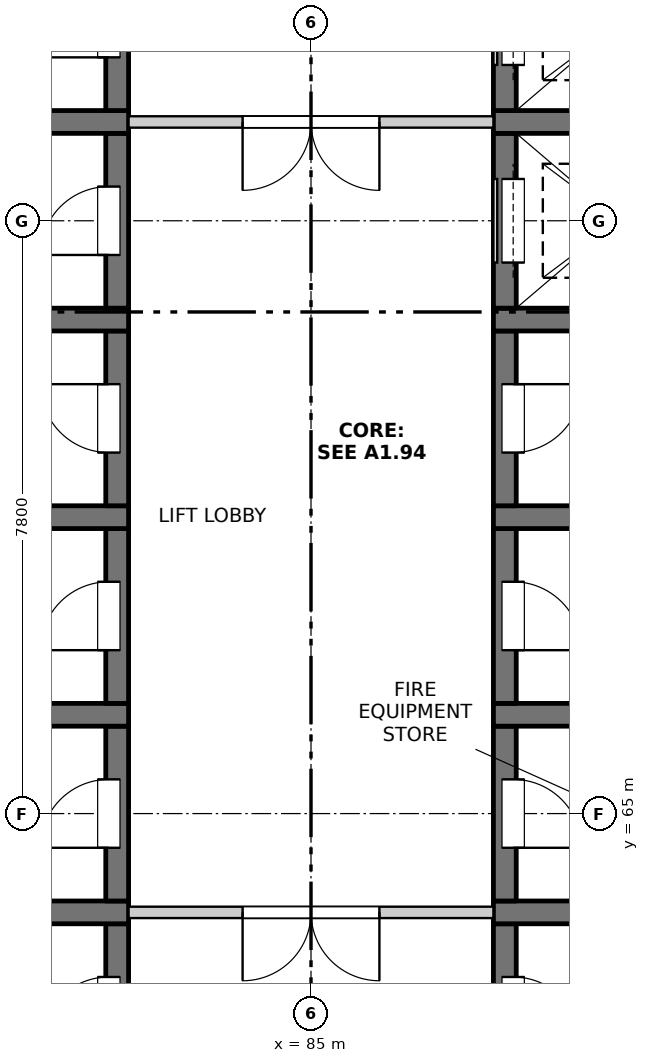
"""IFC4 building model, lengths in metres.
Left out: names, types, materials, properties, quantities, classifications, styles, units other than length and angle.
Written with IfcOpenShell. Run it as: python <this file> out.ifc"""

import sys

from ifc_helpers import new_model, si_unit, direction, frame, frame_2d, origin, place, context, subcontext, project, spatial, rectangle, extrude, element, fill, save


model = new_model("IFC4")
c1 = context("Model", 3, precision=1e-05, world=origin(), true_north=direction((0.0, 1.0)))
c2 = subcontext(c1, "Body", "Model", "MODEL_VIEW")
j1 = project(units=[si_unit("LENGTHUNIT", "METRE"), si_unit("PLANEANGLEUNIT", "RADIAN")], contexts=[c1])
p1 = place(None, origin())
s1 = spatial("IfcSite", under=j1, at=p1, CompositionType="ELEMENT")
p2 = place(p1, origin())
s2 = spatial("IfcBuilding", under=s1, at=p2, CompositionType="ELEMENT")
p3 = place(p2, frame((0.0, 0.0, 158.8)))
s3 = spatial("IfcBuildingStorey", under=s2, at=p3, CompositionType="ELEMENT", Elevation=158.8)
p4 = place(p3, frame((82.45, 61.25, -0.25), z_axis=(0.0, 0.0, 1.0), x_axis=(0.0, 1.0, 0.0)))
e1 = element("IfcWall", 1, at=p4, inside=s3, PredefinedType="SOLIDWALL", context=c2, shape_type="SweptSolid", body=[
    extrude(rectangle(XDim=2.3, YDim=0.3, at=frame_2d((1.15, 0.0))), origin(), (0.0, 0.0, 1.0), 3.4),
])
p5 = place(p4, frame((0.7, 0.0, 0.25)))
e2 = element("IfcOpeningElement", 2, at=p5, cuts=e1, PredefinedType="OPENING", context=c2, shape_type="SweptSolid", body=[
    extrude(rectangle(XDim=0.9, YDim=2.1, at=frame_2d((0.45, 1.05))), frame((0.0, 0.16, 0.0), z_axis=(0.0, -1.0, 0.0), x_axis=(1.0, 0.0, 0.0)), (0.0, 0.0, 1.0), 0.32),
])
p6 = place(p3, frame((79.6, 63.7, -0.25), z_axis=(0.0, 0.0, 1.0), x_axis=(1.0, 0.0, 0.0)))
e3 = element("IfcWall", 3, at=p6, inside=s3, PredefinedType="SOLIDWALL", context=c2, shape_type="SweptSolid", body=[
    extrude(rectangle(XDim=3.0, YDim=0.3, at=frame_2d((1.5, 0.0))), origin(), (0.0, 0.0, 1.0), 3.4),
])
p7 = place(p3, frame((82.45, 63.85, -0.25), z_axis=(0.0, 0.0, 1.0), x_axis=(0.0, 1.0, 0.0)))
e4 = element("IfcWall", 4, at=p7, inside=s3, PredefinedType="SOLIDWALL", context=c2, shape_type="SweptSolid", body=[
    extrude(rectangle(XDim=2.3, YDim=0.3, at=frame_2d((1.15, 0.0))), origin(), (0.0, 0.0, 1.0), 3.4),
])
p8 = place(p7, frame((0.7, 0.0, 0.25)))
e5 = element("IfcOpeningElement", 5, at=p8, cuts=e4, PredefinedType="OPENING", context=c2, shape_type="SweptSolid", body=[
    extrude(rectangle(XDim=0.9, YDim=2.1, at=frame_2d((0.45, 1.05))), frame((0.0, 0.16, 0.0), z_axis=(0.0, -1.0, 0.0), x_axis=(1.0, 0.0, 0.0)), (0.0, 0.0, 1.0), 0.32),
])
p9 = place(p3, frame((79.6, 66.3, -0.25), z_axis=(0.0, 0.0, 1.0), x_axis=(1.0, 0.0, 0.0)))
e6 = element("IfcWall", 6, at=p9, inside=s3, PredefinedType="SOLIDWALL", context=c2, shape_type="SweptSolid", body=[
    extrude(rectangle(XDim=3.0, YDim=0.3, at=frame_2d((1.5, 0.0))), origin(), (0.0, 0.0, 1.0), 3.4),
])
p10 = place(p3, frame((82.45, 66.45, -0.25), z_axis=(0.0, 0.0, 1.0), x_axis=(0.0, 1.0, 0.0)))
e7 = element("IfcWall", 7, at=p10, inside=s3, PredefinedType="SOLIDWALL", context=c2, shape_type="SweptSolid", body=[
    extrude(rectangle(XDim=2.3, YDim=0.3, at=frame_2d((1.15, 0.0))), origin(), (0.0, 0.0, 1.0), 3.4),
])
p11 = place(p10, frame((0.7, 0.0, 0.25)))
e8 = element("IfcOpeningElement", 8, at=p11, cuts=e7, PredefinedType="OPENING", context=c2, shape_type="SweptSolid", body=[
    extrude(rectangle(XDim=0.9, YDim=2.1, at=frame_2d((0.45, 1.05))), frame((0.0, 0.16, 0.0), z_axis=(0.0, -1.0, 0.0), x_axis=(1.0, 0.0, 0.0)), (0.0, 0.0, 1.0), 0.32),
])
p12 = place(p3, frame((79.6, 68.9, -0.25), z_axis=(0.0, 0.0, 1.0), x_axis=(1.0, 0.0, 0.0)))
e9 = element("IfcWall", 9, at=p12, inside=s3, PredefinedType="SOLIDWALL", context=c2, shape_type="SweptSolid", body=[
    extrude(rectangle(XDim=3.0, YDim=0.3, at=frame_2d((1.5, 0.0))), origin(), (0.0, 0.0, 1.0), 3.4),
])
p13 = place(p3, frame((82.45, 69.05, -0.25), z_axis=(0.0, 0.0, 1.0), x_axis=(0.0, 1.0, 0.0)))
e10 = element("IfcWall", 10, at=p13, inside=s3, PredefinedType="SOLIDWALL", context=c2, shape_type="SweptSolid", body=[
    extrude(rectangle(XDim=2.3, YDim=0.3, at=frame_2d((1.15, 0.0))), origin(), (0.0, 0.0, 1.0), 3.4),
])
p14 = place(p13, frame((0.7, 0.0, 0.25)))
e11 = element("IfcOpeningElement", 11, at=p14, cuts=e10, PredefinedType="OPENING", context=c2, shape_type="SweptSolid", body=[
    extrude(rectangle(XDim=0.9, YDim=2.1, at=frame_2d((0.45, 1.05))), frame((0.0, 0.16, 0.0), z_axis=(0.0, -1.0, 0.0), x_axis=(1.0, 0.0, 0.0)), (0.0, 0.0, 1.0), 0.32),
])
p15 = place(p3, frame((79.6, 71.5, -0.25), z_axis=(0.0, 0.0, 1.0), x_axis=(1.0, 0.0, 0.0)))
e12 = element("IfcWall", 12, at=p15, inside=s3, PredefinedType="SOLIDWALL", context=c2, shape_type="SweptSolid", body=[
    extrude(rectangle(XDim=3.0, YDim=0.3, at=frame_2d((1.5, 0.0))), origin(), (0.0, 0.0, 1.0), 3.4),
])
p16 = place(p3, frame((82.45, 71.65, -0.25), z_axis=(0.0, 0.0, 1.0), x_axis=(0.0, 1.0, 0.0)))
e13 = element("IfcWall", 13, at=p16, inside=s3, PredefinedType="SOLIDWALL", context=c2, shape_type="SweptSolid", body=[
    extrude(rectangle(XDim=2.3, YDim=0.3, at=frame_2d((1.15, 0.0))), origin(), (0.0, 0.0, 1.0), 3.4),
])
p17 = place(p16, frame((0.7, 0.0, 0.25)))
e14 = element("IfcOpeningElement", 14, at=p17, cuts=e13, PredefinedType="OPENING", context=c2, shape_type="SweptSolid", body=[
    extrude(rectangle(XDim=0.9, YDim=2.1, at=frame_2d((0.45, 1.05))), frame((0.0, 0.16, 0.0), z_axis=(0.0, -1.0, 0.0), x_axis=(1.0, 0.0, 0.0)), (0.0, 0.0, 1.0), 0.32),
])
p18 = place(p3, frame((79.6, 74.1, -0.25), z_axis=(0.0, 0.0, 1.0), x_axis=(1.0, 0.0, 0.0)))
e15 = element("IfcWall", 15, at=p18, inside=s3, PredefinedType="SOLIDWALL", context=c2, shape_type="SweptSolid", body=[
    extrude(rectangle(XDim=3.0, YDim=0.3, at=frame_2d((1.5, 0.0))), origin(), (0.0, 0.0, 1.0), 3.4),
])
p19 = place(p3, frame((82.45, 74.25, -0.25), z_axis=(0.0, 0.0, 1.0), x_axis=(0.0, 1.0, 0.0)))
e16 = element("IfcWall", 16, at=p19, inside=s3, PredefinedType="SOLIDWALL", context=c2, shape_type="SweptSolid", body=[
    extrude(rectangle(XDim=2.3, YDim=0.3, at=frame_2d((1.15, 0.0))), origin(), (0.0, 0.0, 1.0), 3.4),
])
p20 = place(p19, frame((0.7, 0.0, 0.25)))
e17 = element("IfcOpeningElement", 17, at=p20, cuts=e16, PredefinedType="OPENING", context=c2, shape_type="SweptSolid", body=[
    extrude(rectangle(XDim=0.9, YDim=2.1, at=frame_2d((0.45, 1.05))), frame((0.0, 0.16, 0.0), z_axis=(0.0, -1.0, 0.0), x_axis=(1.0, 0.0, 0.0)), (0.0, 0.0, 1.0), 0.32),
])
p21 = place(p3, frame((87.55, 61.25, -0.25), z_axis=(0.0, 0.0, 1.0), x_axis=(0.0, 1.0, 0.0)))
e18 = element("IfcWall", 18, at=p21, inside=s3, PredefinedType="SOLIDWALL", context=c2, shape_type="SweptSolid", body=[
    extrude(rectangle(XDim=2.3, YDim=0.3, at=frame_2d((1.15, 0.0))), origin(), (0.0, 0.0, 1.0), 3.4),
])
p22 = place(p21, frame((0.7, 0.0, 0.25)))
e19 = element("IfcOpeningElement", 19, at=p22, cuts=e18, PredefinedType="OPENING", context=c2, shape_type="SweptSolid", body=[
    extrude(rectangle(XDim=0.9, YDim=2.1, at=frame_2d((0.45, 1.05))), frame((0.0, 0.16, 0.0), z_axis=(0.0, -1.0, 0.0), x_axis=(1.0, 0.0, 0.0)), (0.0, 0.0, 1.0), 0.32),
])
p23 = place(p3, frame((87.4, 63.7, -0.25), z_axis=(0.0, 0.0, 1.0), x_axis=(1.0, 0.0, 0.0)))
e20 = element("IfcWall", 20, at=p23, inside=s3, PredefinedType="SOLIDWALL", context=c2, shape_type="SweptSolid", body=[
    extrude(rectangle(XDim=3.0, YDim=0.3, at=frame_2d((1.5, 0.0))), origin(), (0.0, 0.0, 1.0), 3.4),
])
p24 = place(p3, frame((87.55, 63.85, -0.25), z_axis=(0.0, 0.0, 1.0), x_axis=(0.0, 1.0, 0.0)))
e21 = element("IfcWall", 21, at=p24, inside=s3, PredefinedType="SOLIDWALL", context=c2, shape_type="SweptSolid", body=[
    extrude(rectangle(XDim=2.3, YDim=0.3, at=frame_2d((1.15, 0.0))), origin(), (0.0, 0.0, 1.0), 3.4),
])
p25 = place(p24, frame((0.7, 0.0, 0.25)))
e22 = element("IfcOpeningElement", 22, at=p25, cuts=e21, PredefinedType="OPENING", context=c2, shape_type="SweptSolid", body=[
    extrude(rectangle(XDim=0.9, YDim=2.1, at=frame_2d((0.45, 1.05))), frame((0.0, 0.16, 0.0), z_axis=(0.0, -1.0, 0.0), x_axis=(1.0, 0.0, 0.0)), (0.0, 0.0, 1.0), 0.32),
])
p26 = place(p3, frame((87.4, 66.3, -0.25), z_axis=(0.0, 0.0, 1.0), x_axis=(1.0, 0.0, 0.0)))
e23 = element("IfcWall", 23, at=p26, inside=s3, PredefinedType="SOLIDWALL", context=c2, shape_type="SweptSolid", body=[
    extrude(rectangle(XDim=3.0, YDim=0.3, at=frame_2d((1.5, 0.0))), origin(), (0.0, 0.0, 1.0), 3.4),
])
p27 = place(p3, frame((87.55, 66.45, -0.25), z_axis=(0.0, 0.0, 1.0), x_axis=(0.0, 1.0, 0.0)))
e24 = element("IfcWall", 24, at=p27, inside=s3, PredefinedType="SOLIDWALL", context=c2, shape_type="SweptSolid", body=[
    extrude(rectangle(XDim=2.3, YDim=0.3, at=frame_2d((1.15, 0.0))), origin(), (0.0, 0.0, 1.0), 3.4),
])
p28 = place(p27, frame((0.7, 0.0, 0.25)))
e25 = element("IfcOpeningElement", 25, at=p28, cuts=e24, PredefinedType="OPENING", context=c2, shape_type="SweptSolid", body=[
    extrude(rectangle(XDim=0.9, YDim=2.1, at=frame_2d((0.45, 1.05))), frame((0.0, 0.16, 0.0), z_axis=(0.0, -1.0, 0.0), x_axis=(1.0, 0.0, 0.0)), (0.0, 0.0, 1.0), 0.32),
])
p29 = place(p3, frame((87.4, 68.9, -0.25), z_axis=(0.0, 0.0, 1.0), x_axis=(1.0, 0.0, 0.0)))
e26 = element("IfcWall", 26, at=p29, inside=s3, PredefinedType="SOLIDWALL", context=c2, shape_type="SweptSolid", body=[
    extrude(rectangle(XDim=3.0, YDim=0.3, at=frame_2d((1.5, 0.0))), origin(), (0.0, 0.0, 1.0), 3.4),
])
p30 = place(p3, frame((87.55, 69.05, -0.25), z_axis=(0.0, 0.0, 1.0), x_axis=(0.0, 1.0, 0.0)))
e27 = element("IfcWall", 27, at=p30, inside=s3, PredefinedType="SOLIDWALL", context=c2, shape_type="SweptSolid", body=[
    extrude(rectangle(XDim=2.3, YDim=0.3, at=frame_2d((1.15, 0.0))), origin(), (0.0, 0.0, 1.0), 3.4),
])
p31 = place(p30, frame((0.7, 0.0, 0.25)))
e28 = element("IfcOpeningElement", 28, at=p31, cuts=e27, PredefinedType="OPENING", context=c2, shape_type="SweptSolid", body=[
    extrude(rectangle(XDim=0.9, YDim=2.1, at=frame_2d((0.45, 1.05))), frame((0.0, 0.16, 0.0), z_axis=(0.0, -1.0, 0.0), x_axis=(1.0, 0.0, 0.0)), (0.0, 0.0, 1.0), 0.32),
])
p32 = place(p3, frame((87.4, 71.5, -0.25), z_axis=(0.0, 0.0, 1.0), x_axis=(1.0, 0.0, 0.0)))
e29 = element("IfcWall", 29, at=p32, inside=s3, PredefinedType="SOLIDWALL", context=c2, shape_type="SweptSolid", body=[
    extrude(rectangle(XDim=3.0, YDim=0.3, at=frame_2d((1.5, 0.0))), origin(), (0.0, 0.0, 1.0), 3.4),
])
p33 = place(p3, frame((87.55, 71.65, -0.25), z_axis=(0.0, 0.0, 1.0), x_axis=(0.0, 1.0, 0.0)))
e30 = element("IfcWall", 30, at=p33, inside=s3, PredefinedType="SOLIDWALL", context=c2, shape_type="SweptSolid", body=[
    extrude(rectangle(XDim=2.3, YDim=0.3, at=frame_2d((1.15, 0.0))), origin(), (0.0, 0.0, 1.0), 3.4),
])
p34 = place(p33, frame((0.6, 0.0, 0.25)))
e31 = element("IfcOpeningElement", 31, at=p34, cuts=e30, PredefinedType="OPENING", context=c2, shape_type="SweptSolid", body=[
    extrude(rectangle(XDim=1.1, YDim=2.1, at=frame_2d((0.55, 1.05))), frame((0.0, 0.16, 0.0), z_axis=(0.0, -1.0, 0.0), x_axis=(1.0, 0.0, 0.0)), (0.0, 0.0, 1.0), 0.32),
])
p35 = place(p3, frame((87.4, 74.1, -0.25), z_axis=(0.0, 0.0, 1.0), x_axis=(1.0, 0.0, 0.0)))
e32 = element("IfcWall", 32, at=p35, inside=s3, PredefinedType="SOLIDWALL", context=c2, shape_type="SweptSolid", body=[
    extrude(rectangle(XDim=3.0, YDim=0.3, at=frame_2d((1.5, 0.0))), origin(), (0.0, 0.0, 1.0), 3.4),
])
p36 = place(p3, frame((87.55, 74.25, -0.25), z_axis=(0.0, 0.0, 1.0), x_axis=(0.0, 1.0, 0.0)))
e33 = element("IfcWall", 33, at=p36, inside=s3, PredefinedType="SOLIDWALL", context=c2, shape_type="SweptSolid", body=[
    extrude(rectangle(XDim=2.3, YDim=0.3, at=frame_2d((1.15, 0.0))), origin(), (0.0, 0.0, 1.0), 3.4),
])
p37 = place(p36, frame((0.6, 0.0, 0.25)))
e34 = element("IfcOpeningElement", 34, at=p37, cuts=e33, PredefinedType="OPENING", context=c2, shape_type="SweptSolid", body=[
    extrude(rectangle(XDim=1.1, YDim=2.1, at=frame_2d((0.55, 1.05))), frame((0.0, 0.16, 0.0), z_axis=(0.0, -1.0, 0.0), x_axis=(1.0, 0.0, 0.0)), (0.0, 0.0, 1.0), 0.32),
])
p38 = place(p3, frame((82.6, 63.7, 0.0), z_axis=(0.0, 0.0, 1.0), x_axis=(1.0, 0.0, 0.0)))
e35 = element("IfcWall", 35, at=p38, inside=s3, PredefinedType="PARTITIONING", context=c2, shape_type="SweptSolid", body=[
    extrude(rectangle(XDim=4.8, YDim=0.15, at=frame_2d((2.4, 0.0))), origin(), (0.0, 0.0, 1.0), 3.15),
])
p39 = place(p38, frame((1.5, 0.0, 0.0)))
e36 = element("IfcOpeningElement", 36, at=p39, cuts=e35, PredefinedType="OPENING", context=c2, shape_type="SweptSolid", body=[
    extrude(rectangle(XDim=1.8, YDim=2.1, at=frame_2d((0.9, 1.05))), frame((0.0, 0.085, 0.0), z_axis=(0.0, -1.0, 0.0), x_axis=(1.0, 0.0, 0.0)), (0.0, 0.0, 1.0), 0.17),
])
p40 = place(p3, frame((82.6, 74.1, 0.0), z_axis=(0.0, 0.0, 1.0), x_axis=(1.0, 0.0, 0.0)))
e37 = element("IfcWall", 37, at=p40, inside=s3, PredefinedType="PARTITIONING", context=c2, shape_type="SweptSolid", body=[
    extrude(rectangle(XDim=4.8, YDim=0.15, at=frame_2d((2.4, 0.0))), origin(), (0.0, 0.0, 1.0), 3.15),
])
p41 = place(p40, frame((1.5, 0.0, 0.0)))
e38 = element("IfcOpeningElement", 38, at=p41, cuts=e37, PredefinedType="OPENING", context=c2, shape_type="SweptSolid", body=[
    extrude(rectangle(XDim=1.8, YDim=2.1, at=frame_2d((0.9, 1.05))), frame((0.0, 0.085, 0.0), z_axis=(0.0, -1.0, 0.0), x_axis=(1.0, 0.0, 0.0)), (0.0, 0.0, 1.0), 0.17),
])
p42 = place(p5, origin())
e39 = element("IfcDoor", 39, at=p42, inside=s3, OperationType="SINGLE_SWING_LEFT", PredefinedType="DOOR", context=c2, shape_type="SweptSolid", body=[
    extrude(rectangle(XDim=0.9, YDim=2.1, at=frame_2d((0.45, 1.05))), frame((0.0, 0.135, 0.0), z_axis=(0.0, -1.0, 0.0), x_axis=(1.0, 0.0, 0.0)), (0.0, 0.0, 1.0), 0.05),
])
fill(e2, e39)
p43 = place(p22, origin())
e40 = element("IfcDoor", 40, at=p43, inside=s3, OperationType="SINGLE_SWING_RIGHT", PredefinedType="DOOR", context=c2, shape_type="SweptSolid", body=[
    extrude(rectangle(XDim=0.9, YDim=2.1, at=frame_2d((0.45, 1.05))), frame((0.0, -0.085, 0.0), z_axis=(0.0, -1.0, 0.0), x_axis=(1.0, 0.0, 0.0)), (0.0, 0.0, 1.0), 0.05),
])
fill(e19, e40)
p44 = place(p39, origin())
e41 = element("IfcDoor", 41, at=p44, inside=s3, OperationType="DOUBLE_DOOR_SINGLE_SWING", PredefinedType="DOOR", context=c2, shape_type="SweptSolid", body=[
    extrude(rectangle(XDim=1.8, YDim=2.1, at=frame_2d((0.9, 1.05))), frame((0.0, 0.025, 0.0), z_axis=(0.0, -1.0, 0.0), x_axis=(1.0, 0.0, 0.0)), (0.0, 0.0, 1.0), 0.05),
])
fill(e36, e41)
p45 = place(p8, origin())
e42 = element("IfcDoor", 42, at=p45, inside=s3, OperationType="SINGLE_SWING_LEFT", PredefinedType="DOOR", context=c2, shape_type="SweptSolid", body=[
    extrude(rectangle(XDim=0.9, YDim=2.1, at=frame_2d((0.45, 1.05))), frame((0.0, 0.135, 0.0), z_axis=(0.0, -1.0, 0.0), x_axis=(1.0, 0.0, 0.0)), (0.0, 0.0, 1.0), 0.05),
])
fill(e5, e42)
p46 = place(p25, origin())
e43 = element("IfcDoor", 43, at=p46, inside=s3, OperationType="SINGLE_SWING_RIGHT", PredefinedType="DOOR", context=c2, shape_type="SweptSolid", body=[
    extrude(rectangle(XDim=0.9, YDim=2.1, at=frame_2d((0.45, 1.05))), frame((0.0, -0.085, 0.0), z_axis=(0.0, -1.0, 0.0), x_axis=(1.0, 0.0, 0.0)), (0.0, 0.0, 1.0), 0.05),
])
fill(e22, e43)
p47 = place(p11, origin())
e44 = element("IfcDoor", 44, at=p47, inside=s3, OperationType="SINGLE_SWING_LEFT", PredefinedType="DOOR", context=c2, shape_type="SweptSolid", body=[
    extrude(rectangle(XDim=0.9, YDim=2.1, at=frame_2d((0.45, 1.05))), frame((0.0, 0.135, 0.0), z_axis=(0.0, -1.0, 0.0), x_axis=(1.0, 0.0, 0.0)), (0.0, 0.0, 1.0), 0.05),
])
fill(e8, e44)
p48 = place(p28, origin())
e45 = element("IfcDoor", 45, at=p48, inside=s3, OperationType="SINGLE_SWING_RIGHT", PredefinedType="DOOR", context=c2, shape_type="SweptSolid", body=[
    extrude(rectangle(XDim=0.9, YDim=2.1, at=frame_2d((0.45, 1.05))), frame((0.0, -0.085, 0.0), z_axis=(0.0, -1.0, 0.0), x_axis=(1.0, 0.0, 0.0)), (0.0, 0.0, 1.0), 0.05),
])
fill(e25, e45)
p49 = place(p14, origin())
e46 = element("IfcDoor", 46, at=p49, inside=s3, OperationType="SINGLE_SWING_RIGHT", PredefinedType="DOOR", context=c2, shape_type="SweptSolid", body=[
    extrude(rectangle(XDim=0.9, YDim=2.1, at=frame_2d((0.45, 1.05))), frame((0.0, 0.135, 0.0), z_axis=(0.0, -1.0, 0.0), x_axis=(1.0, 0.0, 0.0)), (0.0, 0.0, 1.0), 0.05),
])
fill(e11, e46)
p50 = place(p31, origin())
e47 = element("IfcDoor", 47, at=p50, inside=s3, OperationType="SINGLE_SWING_LEFT", PredefinedType="DOOR", context=c2, shape_type="SweptSolid", body=[
    extrude(rectangle(XDim=0.9, YDim=2.1, at=frame_2d((0.45, 1.05))), frame((0.0, -0.085, 0.0), z_axis=(0.0, -1.0, 0.0), x_axis=(1.0, 0.0, 0.0)), (0.0, 0.0, 1.0), 0.05),
])
fill(e28, e47)
p51 = place(p17, origin())
e48 = element("IfcDoor", 48, at=p51, inside=s3, OperationType="SINGLE_SWING_LEFT", PredefinedType="DOOR", context=c2, shape_type="SweptSolid", body=[
    extrude(rectangle(XDim=0.9, YDim=2.1, at=frame_2d((0.45, 1.05))), frame((0.0, 0.135, 0.0), z_axis=(0.0, -1.0, 0.0), x_axis=(1.0, 0.0, 0.0)), (0.0, 0.0, 1.0), 0.05),
])
fill(e14, e48)
p52 = place(p34, origin())
e49 = element("IfcDoor", 49, at=p52, inside=s3, OperationType="SLIDING_TO_LEFT", PredefinedType="DOOR", context=c2, shape_type="SweptSolid", body=[
    extrude(rectangle(XDim=1.1, YDim=2.1, at=frame_2d((0.55, 1.05))), frame((0.0, -0.085, 0.0), z_axis=(0.0, -1.0, 0.0), x_axis=(1.0, 0.0, 0.0)), (0.0, 0.0, 1.0), 0.05),
])
fill(e31, e49)
p53 = place(p41, origin())
e50 = element("IfcDoor", 50, at=p53, inside=s3, OperationType="DOUBLE_DOOR_SINGLE_SWING", PredefinedType="DOOR", context=c2, shape_type="SweptSolid", body=[
    extrude(rectangle(XDim=1.8, YDim=2.1, at=frame_2d((0.9, 1.05))), frame((0.0, 0.025, 0.0), z_axis=(0.0, -1.0, 0.0), x_axis=(1.0, 0.0, 0.0)), (0.0, 0.0, 1.0), 0.05),
])
fill(e38, e50)
p54 = place(p20, origin())
e51 = element("IfcDoor", 51, at=p54, inside=s3, OperationType="SINGLE_SWING_LEFT", PredefinedType="DOOR", context=c2, shape_type="SweptSolid", body=[
    extrude(rectangle(XDim=0.9, YDim=2.1, at=frame_2d((0.45, 1.05))), frame((0.0, 0.135, 0.0), z_axis=(0.0, -1.0, 0.0), x_axis=(1.0, 0.0, 0.0)), (0.0, 0.0, 1.0), 0.05),
])
fill(e17, e51)
p55 = place(p37, origin())
e52 = element("IfcDoor", 52, at=p55, inside=s3, OperationType="SLIDING_TO_LEFT", PredefinedType="DOOR", context=c2, shape_type="SweptSolid", body=[
    extrude(rectangle(XDim=1.1, YDim=2.1, at=frame_2d((0.55, 1.05))), frame((0.0, -0.085, 0.0), z_axis=(0.0, -1.0, 0.0), x_axis=(1.0, 0.0, 0.0)), (0.0, 0.0, 1.0), 0.05),
])
fill(e34, e52)
save(model, sys.argv[1])
